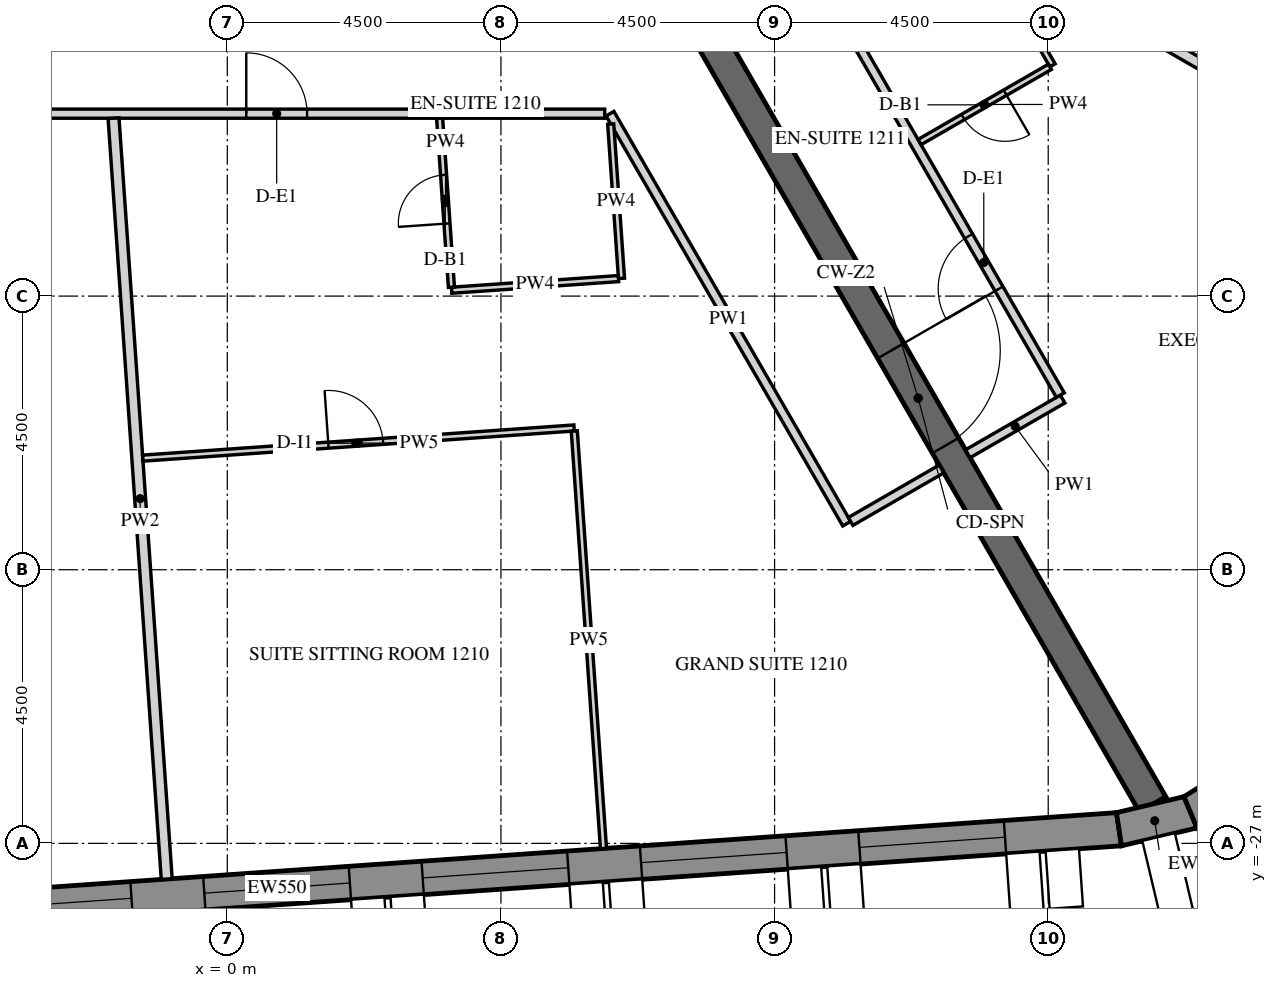
"""IFC4 building model, lengths in metres.
Left out: names, types, materials, properties, quantities, classifications, styles, units other than length and angle.
Written with IfcOpenShell. Run it as: python <this file> out.ifc"""

import sys

from ifc_helpers import new_model, si_unit, direction, frame, frame_2d, origin, place, context, subcontext, project, spatial, polyline, rectangle, outline, extrude, element, fill, save


model = new_model("IFC4")
c1 = context("Model", 3, precision=1e-05, world=origin(), true_north=direction((0.0, 1.0)))
c2 = subcontext(c1, "Body", "Model", "MODEL_VIEW")
j1 = project(units=[si_unit("LENGTHUNIT", "METRE"), si_unit("PLANEANGLEUNIT", "RADIAN")], contexts=[c1])
p1 = place(None, origin())
s1 = spatial("IfcSite", under=j1, at=p1, CompositionType="ELEMENT")
p2 = place(p1, origin())
s2 = spatial("IfcBuilding", under=s1, at=p2, CompositionType="ELEMENT")
p3 = place(p2, frame((0.0, 0.0, 164.4)))
s3 = spatial("IfcBuildingStorey", under=s2, at=p3, CompositionType="ELEMENT", Elevation=164.4)
p4 = place(p3, frame((-13.026, -28.704, -0.15), z_axis=(0.0, 0.0, 1.0), x_axis=(0.99756406806, 0.069756219185, 0.0)))
e1 = element("IfcWall", 1, at=p4, inside=s3, PredefinedType="SOLIDWALL", context=c2, shape_type="SweptSolid", body=[
    extrude(outline(polyline([(-0.026, -0.275), (27.78, -0.275), (27.735, 0.275), (0.026, 0.275), (-0.026, -0.275)])), origin(), (0.0, 0.0, 1.0), 3.9),
])
p5 = place(p4, frame((1.879, 0.0, 1.05)))
e2 = element("IfcOpeningElement", 2, at=p5, cuts=e1, PredefinedType="OPENING", context=c2, shape_type="SweptSolid", body=[
    extrude(rectangle(XDim=2.4, YDim=2.4, at=frame_2d((1.2, 1.2))), frame((0.0, 0.285, 0.0), z_axis=(0.0, -1.0, 0.0), x_axis=(1.0, 0.0, 0.0)), (0.0, 0.0, 1.0), 0.57),
])
p6 = place(p4, frame((5.479, 0.0, 1.05)))
e3 = element("IfcOpeningElement", 3, at=p6, cuts=e1, PredefinedType="OPENING", context=c2, shape_type="SweptSolid", body=[
    extrude(rectangle(XDim=2.4, YDim=2.4, at=frame_2d((1.2, 1.2))), frame((0.0, 0.285, 0.0), z_axis=(0.0, -1.0, 0.0), x_axis=(1.0, 0.0, 0.0)), (0.0, 0.0, 1.0), 0.57),
])
p7 = place(p4, frame((9.079, 0.0, 1.05)))
e4 = element("IfcOpeningElement", 4, at=p7, cuts=e1, PredefinedType="OPENING", context=c2, shape_type="SweptSolid", body=[
    extrude(rectangle(XDim=2.4, YDim=2.4, at=frame_2d((1.2, 1.2))), frame((0.0, 0.285, 0.0), z_axis=(0.0, -1.0, 0.0), x_axis=(1.0, 0.0, 0.0)), (0.0, 0.0, 1.0), 0.57),
])
p8 = place(p4, frame((12.679, 0.0, 1.05)))
e5 = element("IfcOpeningElement", 5, at=p8, cuts=e1, PredefinedType="OPENING", context=c2, shape_type="SweptSolid", body=[
    extrude(rectangle(XDim=2.4, YDim=2.4, at=frame_2d((1.2, 1.2))), frame((0.0, 0.285, 0.0), z_axis=(0.0, -1.0, 0.0), x_axis=(1.0, 0.0, 0.0)), (0.0, 0.0, 1.0), 0.57),
])
p9 = place(p4, frame((16.279, 0.0, 1.05)))
e6 = element("IfcOpeningElement", 6, at=p9, cuts=e1, PredefinedType="OPENING", context=c2, shape_type="SweptSolid", body=[
    extrude(rectangle(XDim=2.4, YDim=2.4, at=frame_2d((1.2, 1.2))), frame((0.0, 0.285, 0.0), z_axis=(0.0, -1.0, 0.0), x_axis=(1.0, 0.0, 0.0)), (0.0, 0.0, 1.0), 0.57),
])
p10 = place(p4, frame((19.879, 0.0, 1.05)))
e7 = element("IfcOpeningElement", 7, at=p10, cuts=e1, PredefinedType="OPENING", context=c2, shape_type="SweptSolid", body=[
    extrude(rectangle(XDim=2.4, YDim=2.4, at=frame_2d((1.2, 1.2))), frame((0.0, 0.285, 0.0), z_axis=(0.0, -1.0, 0.0), x_axis=(1.0, 0.0, 0.0)), (0.0, 0.0, 1.0), 0.57),
])
p11 = place(p4, frame((23.479, 0.0, 1.05)))
e8 = element("IfcOpeningElement", 8, at=p11, cuts=e1, PredefinedType="OPENING", context=c2, shape_type="SweptSolid", body=[
    extrude(rectangle(XDim=2.4, YDim=2.4, at=frame_2d((1.2, 1.2))), frame((0.0, 0.285, 0.0), z_axis=(0.0, -1.0, 0.0), x_axis=(1.0, 0.0, 0.0)), (0.0, 0.0, 1.0), 0.57),
])
p12 = place(p3, frame((14.664, -26.767, -0.15), z_axis=(0.0, 0.0, 1.0), x_axis=(0.973063591128, 0.230536868247, 0.0)))
e9 = element("IfcWall", 9, at=p12, inside=s3, PredefinedType="SOLIDWALL", context=c2, shape_type="SweptSolid", body=[
    extrude(outline(polyline([(-0.022, -0.275), (1.253, -0.275), (1.163, 0.275), (0.022, 0.275), (-0.022, -0.275)])), origin(), (0.0, 0.0, 1.0), 3.9),
])
p13 = place(p3, frame((15.84, -26.489, -0.15), z_axis=(0.0, 0.0, 1.0), x_axis=(0.848009655012, 0.52998077796, 0.0)))
e10 = element("IfcWall", 10, at=p13, inside=s3, PredefinedType="SOLIDWALL", context=c2, shape_type="SweptSolid", body=[
    extrude(outline(polyline([(-0.045, -0.275), (1.253, -0.275), (1.163, 0.275), (0.045, 0.275), (-0.045, -0.275)])), origin(), (0.0, 0.0, 1.0), 3.9),
])
p14 = place(p3, frame((7.506, -13.0, -0.15), z_axis=(0.0, 0.0, 1.0), x_axis=(0.499988271576, -0.866032175087, 0.0)))
e11 = element("IfcWall", 11, at=p14, inside=s3, PredefinedType="SHEAR", context=c2, shape_type="SweptSolid", body=[
    extrude(rectangle(XDim=15.424, YDim=0.5, at=frame_2d((7.712, 0.0))), origin(), (0.0, 0.0, 1.0), 3.9),
])
p15 = place(p14, frame((6.812, 0.0, 0.15)))
e12 = element("IfcOpeningElement", 12, at=p15, cuts=e11, PredefinedType="OPENING", context=c2, shape_type="SweptSolid", body=[
    extrude(rectangle(XDim=1.8, YDim=2.4, at=frame_2d((0.9, 1.2))), frame((0.0, 0.26, 0.0), z_axis=(0.0, -1.0, 0.0), x_axis=(1.0, 0.0, 0.0)), (0.0, 0.0, 1.0), 0.52),
])
p16 = place(p3, frame((-8.574, -15.0, 0.0), z_axis=(0.0, 0.0, 1.0), x_axis=(1.0, 0.0, 0.0)))
e13 = element("IfcWall", 13, at=p16, inside=s3, PredefinedType="PARTITIONING", context=c2, shape_type="SweptSolid", body=[
    extrude(rectangle(XDim=14.78, YDim=0.15, at=frame_2d((7.39, 0.0))), origin(), (0.0, 0.0, 1.0), 2.988),
])
p17 = place(p16, frame((4.445, 0.0, 0.0)))
e14 = element("IfcOpeningElement", 14, at=p17, cuts=e13, PredefinedType="OPENING", context=c2, shape_type="SweptSolid", body=[
    extrude(rectangle(XDim=1.0, YDim=2.1, at=frame_2d((0.5, 1.05))), frame((0.0, 0.085, 0.0), z_axis=(0.0, -1.0, 0.0), x_axis=(1.0, 0.0, 0.0)), (0.0, 0.0, 1.0), 0.17),
])
p18 = place(p16, frame((8.885, 0.0, 0.0)))
e15 = element("IfcOpeningElement", 15, at=p18, cuts=e13, PredefinedType="OPENING", context=c2, shape_type="SweptSolid", body=[
    extrude(rectangle(XDim=1.0, YDim=2.1, at=frame_2d((0.5, 1.05))), frame((0.0, 0.085, 0.0), z_axis=(0.0, -1.0, 0.0), x_axis=(1.0, 0.0, 0.0)), (0.0, 0.0, 1.0), 0.17),
])
p19 = place(p3, frame((6.293, -15.0, 0.0), z_axis=(0.0, 0.0, 1.0), x_axis=(0.499980313799, -0.86603676932, 0.0)))
e16 = element("IfcWall", 16, at=p19, inside=s3, PredefinedType="PARTITIONING", context=c2, shape_type="SweptSolid", body=[
    extrude(rectangle(XDim=7.786, YDim=0.15, at=frame_2d((3.893, 0.0))), origin(), (0.0, 0.0, 1.0), 2.988),
])
p20 = place(p3, frame((10.251, -21.705, 0.0), z_axis=(0.0, 0.0, 1.0), x_axis=(0.866013532718, 0.500020560727, 0.0)))
e17 = element("IfcWall", 17, at=p20, inside=s3, PredefinedType="PARTITIONING", context=c2, shape_type="SweptSolid", body=[
    extrude(rectangle(XDim=1.725, YDim=0.15, at=frame_2d((0.863, 0.0))), origin(), (0.0, 0.0, 1.0), 2.988),
])
p21 = place(p3, frame((12.178, -20.593, 0.0), z_axis=(0.0, 0.0, 1.0), x_axis=(0.866047807691, 0.499961193289, 0.0)))
e18 = element("IfcWall", 18, at=p21, inside=s3, PredefinedType="PARTITIONING", context=c2, shape_type="SweptSolid", body=[
    extrude(rectangle(XDim=1.8, YDim=0.15, at=frame_2d((0.9, 0.0))), origin(), (0.0, 0.0, 1.0), 2.988),
])
p22 = place(p3, frame((13.699, -19.628, 0.0), z_axis=(0.0, 0.0, 1.0), x_axis=(-0.499995202058, 0.86602817386, 0.0)))
e19 = element("IfcWall", 19, at=p22, inside=s3, PredefinedType="PARTITIONING", context=c2, shape_type="SweptSolid", body=[
    extrude(rectangle(XDim=7.361, YDim=0.15, at=frame_2d((3.68, 0.0))), origin(), (0.0, 0.0, 1.0), 2.988),
])
p23 = place(p22, frame((2.018, 0.0, 0.0)))
e20 = element("IfcOpeningElement", 20, at=p23, cuts=e19, PredefinedType="OPENING", context=c2, shape_type="SweptSolid", body=[
    extrude(rectangle(XDim=1.0, YDim=2.1, at=frame_2d((0.5, 1.05))), frame((0.0, 0.085, 0.0), z_axis=(0.0, -1.0, 0.0), x_axis=(1.0, 0.0, 0.0)), (0.0, 0.0, 1.0), 0.17),
])
p24 = place(p3, frame((-0.996, -27.587, 0.0), z_axis=(0.0, 0.0, 1.0), x_axis=(-0.069744671963, 0.997564875451, 0.0)))
e21 = element("IfcWall", 21, at=p24, inside=s3, PredefinedType="PARTITIONING", context=c2, shape_type="SweptSolid", body=[
    extrude(rectangle(XDim=12.542, YDim=0.18, at=frame_2d((6.271, 0.0))), origin(), (0.0, 0.0, 1.0), 2.988),
])
p25 = place(p3, frame((6.305, -15.171, 0.0), z_axis=(0.0, 0.0, 1.0), x_axis=(0.069671554491, -0.99756998476, 0.0)))
e22 = element("IfcWall", 22, at=p25, inside=s3, PredefinedType="PARTITIONING", context=c2, shape_type="SweptSolid", body=[
    extrude(rectangle(XDim=2.544, YDim=0.1, at=frame_2d((1.272, 0.0))), origin(), (0.0, 0.0, 1.0), 2.988),
])
p26 = place(p3, frame((6.433, -17.712, 0.0), z_axis=(0.0, 0.0, 1.0), x_axis=(-0.997562614302, -0.069777005859, 0.0)))
e23 = element("IfcWall", 23, at=p26, inside=s3, PredefinedType="PARTITIONING", context=c2, shape_type="SweptSolid", body=[
    extrude(rectangle(XDim=2.75, YDim=0.1, at=frame_2d((1.375, 0.0))), origin(), (0.0, 0.0, 1.0), 2.988),
])
p27 = place(p3, frame((3.686, -17.854, 0.0), z_axis=(0.0, 0.0, 1.0), x_axis=(-0.069758488261, 0.997563909389, 0.0)))
e24 = element("IfcWall", 24, at=p27, inside=s3, PredefinedType="PARTITIONING", context=c2, shape_type="SweptSolid", body=[
    extrude(rectangle(XDim=2.786, YDim=0.1, at=frame_2d((1.393, 0.0))), origin(), (0.0, 0.0, 1.0), 2.988),
])
p28 = place(p27, frame((1.05, 0.0, 0.0)))
e25 = element("IfcOpeningElement", 25, at=p28, cuts=e24, PredefinedType="OPENING", context=c2, shape_type="SweptSolid", body=[
    extrude(rectangle(XDim=0.8, YDim=2.1, at=frame_2d((0.4, 1.05))), frame((0.0, 0.06, 0.0), z_axis=(0.0, -1.0, 0.0), x_axis=(1.0, 0.0, 0.0)), (0.0, 0.0, 1.0), 0.12),
])
p29 = place(p3, frame((-1.39, -20.665, 0.0), z_axis=(0.0, 0.0, 1.0), x_axis=(0.997565277642, 0.069738919141, 0.0)))
e26 = element("IfcWall", 26, at=p29, inside=s3, PredefinedType="PARTITIONING", context=c2, shape_type="SweptSolid", body=[
    extrude(rectangle(XDim=7.11, YDim=0.1, at=frame_2d((3.555, 0.0))), origin(), (0.0, 0.0, 1.0), 2.988),
])
p30 = place(p29, frame((3.06, 0.0, 0.0)))
e27 = element("IfcOpeningElement", 27, at=p30, cuts=e26, PredefinedType="OPENING", context=c2, shape_type="SweptSolid", body=[
    extrude(rectangle(XDim=0.9, YDim=2.1, at=frame_2d((0.45, 1.05))), frame((0.0, 0.06, 0.0), z_axis=(0.0, -1.0, 0.0), x_axis=(1.0, 0.0, 0.0)), (0.0, 0.0, 1.0), 0.12),
])
p31 = place(p3, frame((5.706, -20.219, 0.0), z_axis=(0.0, 0.0, 1.0), x_axis=(0.069774766037, -0.99756277097, 0.0)))
e28 = element("IfcWall", 28, at=p31, inside=s3, PredefinedType="PARTITIONING", context=c2, shape_type="SweptSolid", body=[
    extrude(rectangle(XDim=6.883, YDim=0.1, at=frame_2d((3.441, 0.0))), origin(), (0.0, 0.0, 1.0), 2.988),
])
p32 = place(p3, frame((12.426, -12.223, 0.0), z_axis=(0.0, 0.0, 1.0), x_axis=(0.499959451571, -0.866048813165, 0.0)))
e29 = element("IfcWall", 29, at=p32, inside=s3, PredefinedType="PARTITIONING", context=c2, shape_type="SweptSolid", body=[
    extrude(rectangle(XDim=2.289, YDim=0.1, at=frame_2d((1.145, 0.0))), origin(), (0.0, 0.0, 1.0), 2.988),
])
p33 = place(p3, frame((13.527, -14.23, 0.0), z_axis=(0.0, 0.0, 1.0), x_axis=(-0.866006523861, -0.500032699561, 0.0)))
e30 = element("IfcWall", 30, at=p33, inside=s3, PredefinedType="PARTITIONING", context=c2, shape_type="SweptSolid", body=[
    extrude(rectangle(XDim=2.475, YDim=0.1, at=frame_2d((1.237, 0.0))), origin(), (0.0, 0.0, 1.0), 2.988),
])
p34 = place(p33, frame((0.85, 0.0, 0.0)))
e31 = element("IfcOpeningElement", 31, at=p34, cuts=e30, PredefinedType="OPENING", context=c2, shape_type="SweptSolid", body=[
    extrude(rectangle(XDim=0.8, YDim=2.1, at=frame_2d((0.4, 1.05))), frame((0.0, 0.06, 0.0), z_axis=(0.0, -1.0, 0.0), x_axis=(1.0, 0.0, 0.0)), (0.0, 0.0, 1.0), 0.12),
])
p35 = place(p3, frame((21.631, -17.433, 0.0), z_axis=(0.0, 0.0, 1.0), x_axis=(-0.866030310389, 0.499991501415, 0.0)))
e32 = element("IfcWall", 32, at=p35, inside=s3, PredefinedType="PARTITIONING", context=c2, shape_type="SweptSolid", body=[
    extrude(rectangle(XDim=10.735, YDim=0.18, at=frame_2d((5.368, 0.0))), origin(), (0.0, 0.0, 1.0), 2.988),
])
p36 = place(p7, frame((0.0, 0.205, 0.0)))
e33 = element("IfcWindow", 33, at=p36, inside=s3, PartitioningType="DOUBLE_PANEL_VERTICAL", PredefinedType="WINDOW", context=c2, shape_type="SweptSolid", body=[
    extrude(rectangle(XDim=2.4, YDim=2.4, at=frame_2d((1.2, 1.2))), frame((0.0, 0.03, 0.0), z_axis=(0.0, -1.0, 0.0), x_axis=(1.0, 0.0, 0.0)), (0.0, 0.0, 1.0), 0.06),
])
fill(e4, e33)
p37 = place(p8, frame((0.0, 0.205, 0.0)))
e34 = element("IfcWindow", 34, at=p37, inside=s3, PartitioningType="DOUBLE_PANEL_VERTICAL", PredefinedType="WINDOW", context=c2, shape_type="SweptSolid", body=[
    extrude(rectangle(XDim=2.4, YDim=2.4, at=frame_2d((1.2, 1.2))), frame((0.0, 0.03, 0.0), z_axis=(0.0, -1.0, 0.0), x_axis=(1.0, 0.0, 0.0)), (0.0, 0.0, 1.0), 0.06),
])
fill(e5, e34)
p38 = place(p9, frame((0.0, 0.205, 0.0)))
e35 = element("IfcWindow", 35, at=p38, inside=s3, PartitioningType="DOUBLE_PANEL_VERTICAL", PredefinedType="WINDOW", context=c2, shape_type="SweptSolid", body=[
    extrude(rectangle(XDim=2.4, YDim=2.4, at=frame_2d((1.2, 1.2))), frame((0.0, 0.03, 0.0), z_axis=(0.0, -1.0, 0.0), x_axis=(1.0, 0.0, 0.0)), (0.0, 0.0, 1.0), 0.06),
])
fill(e6, e35)
p39 = place(p10, frame((0.0, 0.205, 0.0)))
e36 = element("IfcWindow", 36, at=p39, inside=s3, PartitioningType="DOUBLE_PANEL_VERTICAL", PredefinedType="WINDOW", context=c2, shape_type="SweptSolid", body=[
    extrude(rectangle(XDim=2.4, YDim=2.4, at=frame_2d((1.2, 1.2))), frame((0.0, 0.03, 0.0), z_axis=(0.0, -1.0, 0.0), x_axis=(1.0, 0.0, 0.0)), (0.0, 0.0, 1.0), 0.06),
])
fill(e7, e36)
p40 = place(p11, frame((0.0, 0.205, 0.0)))
e37 = element("IfcWindow", 37, at=p40, inside=s3, PartitioningType="DOUBLE_PANEL_VERTICAL", PredefinedType="WINDOW", context=c2, shape_type="SweptSolid", body=[
    extrude(rectangle(XDim=2.4, YDim=2.4, at=frame_2d((1.2, 1.2))), frame((0.0, 0.03, 0.0), z_axis=(0.0, -1.0, 0.0), x_axis=(1.0, 0.0, 0.0)), (0.0, 0.0, 1.0), 0.06),
])
fill(e8, e37)
p41 = place(p15, origin())
e38 = element("IfcDoor", 38, at=p41, inside=s3, OperationType="DOUBLE_DOOR_SINGLE_SWING", PredefinedType="DOOR", context=c2, shape_type="SweptSolid", body=[
    extrude(rectangle(XDim=1.8, YDim=2.4, at=frame_2d((0.9, 1.2))), frame((0.0, 0.025, 0.0), z_axis=(0.0, -1.0, 0.0), x_axis=(1.0, 0.0, 0.0)), (0.0, 0.0, 1.0), 0.05),
])
fill(e12, e38)
p42 = place(p18, origin())
e39 = element("IfcDoor", 39, at=p42, inside=s3, OperationType="SINGLE_SWING_RIGHT", PredefinedType="DOOR", context=c2, shape_type="SweptSolid", body=[
    extrude(rectangle(XDim=1.0, YDim=2.1, at=frame_2d((0.5, 1.05))), frame((0.0, 0.025, 0.0), z_axis=(0.0, -1.0, 0.0), x_axis=(1.0, 0.0, 0.0)), (0.0, 0.0, 1.0), 0.05),
])
fill(e15, e39)
p43 = place(p28, origin())
e40 = element("IfcDoor", 40, at=p43, inside=s3, OperationType="SINGLE_SWING_LEFT", PredefinedType="DOOR", context=c2, shape_type="SweptSolid", body=[
    extrude(rectangle(XDim=0.8, YDim=2.1, at=frame_2d((0.4, 1.05))), frame((0.0, 0.025, 0.0), z_axis=(0.0, -1.0, 0.0), x_axis=(1.0, 0.0, 0.0)), (0.0, 0.0, 1.0), 0.05),
])
fill(e25, e40)
p44 = place(p30, origin())
e41 = element("IfcDoor", 41, at=p44, inside=s3, OperationType="SINGLE_SWING_RIGHT", PredefinedType="DOOR", context=c2, shape_type="SweptSolid", body=[
    extrude(rectangle(XDim=0.9, YDim=2.1, at=frame_2d((0.45, 1.05))), frame((0.0, 0.025, 0.0), z_axis=(0.0, -1.0, 0.0), x_axis=(1.0, 0.0, 0.0)), (0.0, 0.0, 1.0), 0.05),
])
fill(e27, e41)
p45 = place(p23, origin())
e42 = element("IfcDoor", 42, at=p45, inside=s3, OperationType="SINGLE_SWING_LEFT", PredefinedType="DOOR", context=c2, shape_type="SweptSolid", body=[
    extrude(rectangle(XDim=1.0, YDim=2.1, at=frame_2d((0.5, 1.05))), frame((0.0, 0.025, 0.0), z_axis=(0.0, -1.0, 0.0), x_axis=(1.0, 0.0, 0.0)), (0.0, 0.0, 1.0), 0.05),
])
fill(e20, e42)
p46 = place(p34, origin())
e43 = element("IfcDoor", 43, at=p46, inside=s3, OperationType="SINGLE_SWING_RIGHT", PredefinedType="DOOR", context=c2, shape_type="SweptSolid", body=[
    extrude(rectangle(XDim=0.8, YDim=2.1, at=frame_2d((0.4, 1.05))), frame((0.0, 0.025, 0.0), z_axis=(0.0, -1.0, 0.0), x_axis=(1.0, 0.0, 0.0)), (0.0, 0.0, 1.0), 0.05),
])
fill(e31, e43)
save(model, sys.argv[1])
